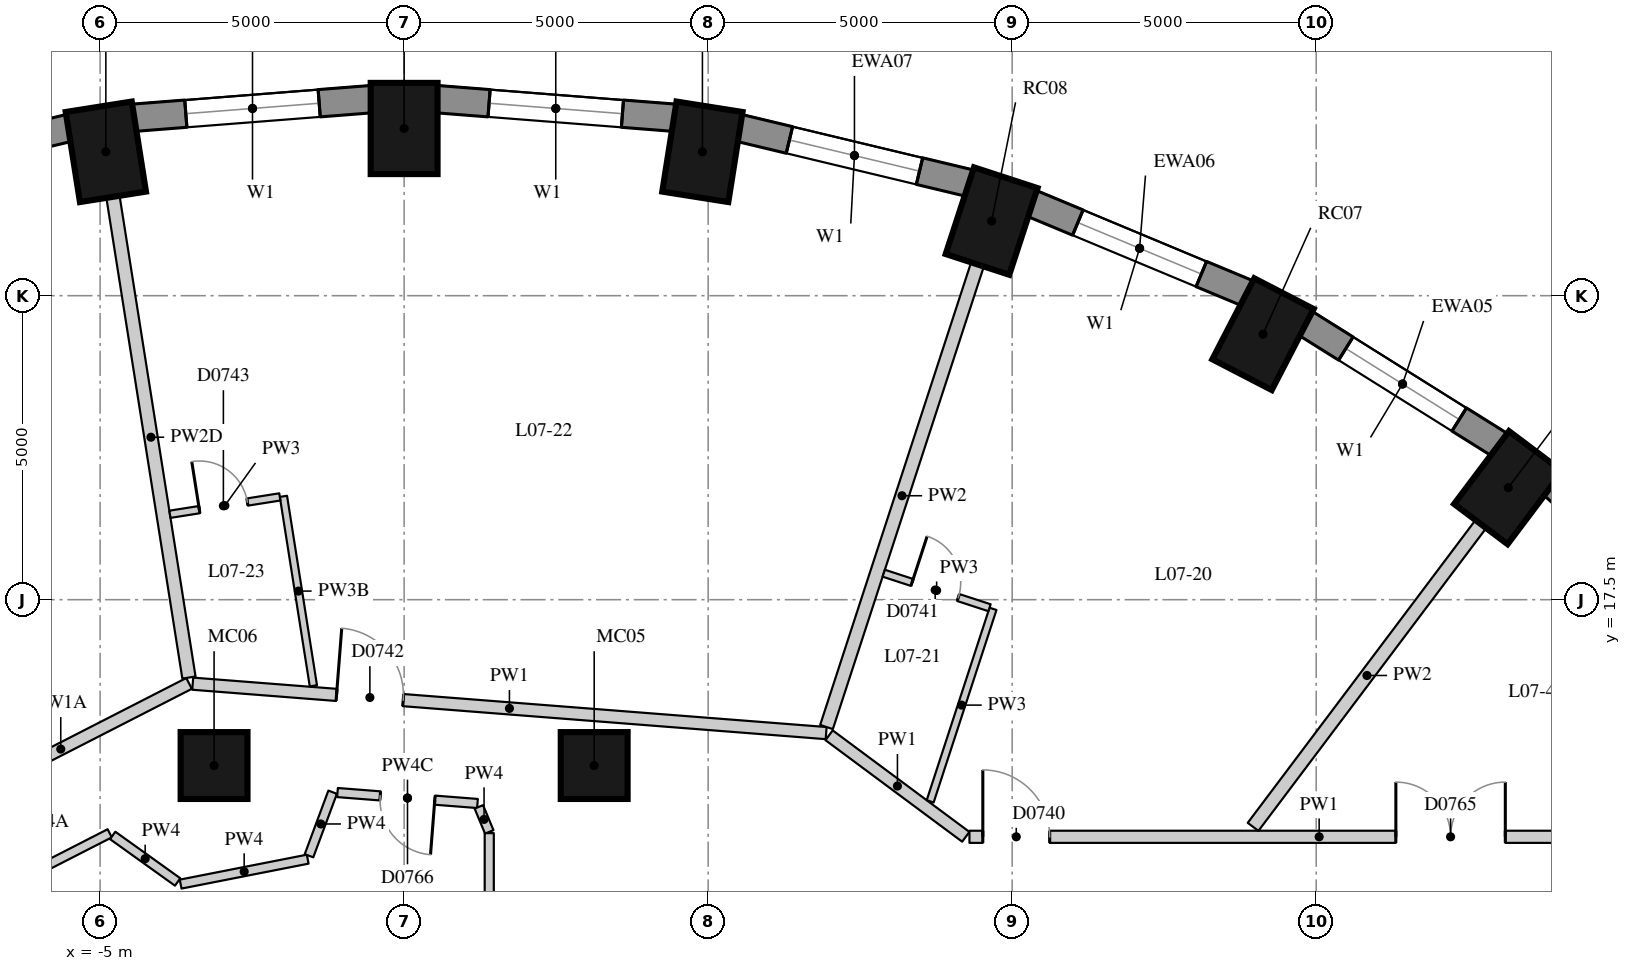
"""IFC4 building model, lengths in metres.
Left out: names, types, materials, properties, quantities, classifications, styles, units other than length and angle.
Written with IfcOpenShell. Run it as: python <this file> out.ifc"""

import sys

from ifc_helpers import new_model, si_unit, direction, frame, frame_2d, origin, origin_2d, place, context, subcontext, project, spatial, rectangle, extrude, element, fill, save


model = new_model("IFC4")
c1 = context("Model", 3, precision=1e-05, world=origin(), true_north=direction((0.0, 1.0)))
c2 = subcontext(c1, "Body", "Model", "MODEL_VIEW")
j1 = project(units=[si_unit("LENGTHUNIT", "METRE"), si_unit("PLANEANGLEUNIT", "RADIAN")], contexts=[c1])
p1 = place(None, origin())
s1 = spatial("IfcSite", under=j1, at=p1, CompositionType="ELEMENT")
p2 = place(p1, origin())
s2 = spatial("IfcBuilding", under=s1, at=p2, CompositionType="ELEMENT")
p3 = place(p2, frame((0.0, 0.0, 31.6)))
s3 = spatial("IfcBuildingStorey", under=s2, at=p3, CompositionType="ELEMENT", Elevation=31.6)
for number, where, z_axis, x_axis in (
    (1, (18.159, 19.343, 0.0), (0.0, 0.0, 1.0), (0.601, 0.799, 0.0)),
    (2, (14.125, 21.867, 0.0), (0.0, 0.0, 1.0), (0.46, 0.888, 0.0)),
    (3, (9.662, 23.727, 0.0), (0.0, 0.0, 1.0), (0.31, 0.951, 0.0)),
    (4, (4.906, 24.866, 0.0), (0.0, 0.0, 1.0), (0.156, 0.988, 0.0)),
    (5, (0.0, 25.25, 0.0), (0.0, 0.0, 1.0), (0.0, 1.0, 0.0)),
    (6, (-4.906, 24.866, 0.0), (0.0, 0.0, 1.0), (-0.156, 0.988, 0.0)),
):
    element("IfcColumn", number, at=place(p3, frame(where, z_axis=z_axis, x_axis=x_axis)), inside=s3, PredefinedType="COLUMN", context=c2, shape_type="SweptSolid", body=[
        extrude(rectangle(XDim=1.5, YDim=1.1, at=origin_2d()), origin(), (0.0, 0.0, 1.0), 3.3),
    ])
for number, where, z_axis, x_axis in (
    (7, (3.126, 14.772, 0.0), (0.0, 0.0, 1.0), (1.0, 0.0, 0.0)),
    (8, (-3.126, 14.772, 0.0), (0.0, 0.0, 1.0), (1.0, 0.0, 0.0)),
):
    element("IfcColumn", number, at=place(p3, frame(where, z_axis=z_axis, x_axis=x_axis)), inside=s3, PredefinedType="COLUMN", context=c2, shape_type="SweptSolid", body=[
        extrude(rectangle(XDim=1.1, YDim=1.1, at=origin_2d()), origin(), (0.0, 0.0, 1.0), 3.3),
    ])
p4 = place(p3, frame((21.627, 16.943, 0.0), z_axis=(0.0, 0.0, 1.0), x_axis=(-0.745526233716, 0.66647628228, 0.0)))
e9 = element("IfcWall", 9, at=p4, inside=s3, PredefinedType="SOLIDWALL", context=c2, shape_type="SweptSolid", body=[
    extrude(rectangle(XDim=3.697, YDim=0.45, at=frame_2d((1.848, 0.0))), origin(), (0.0, 0.0, 1.0), 3.02),
])
p5 = place(p3, frame((18.023, 20.044, 0.0), z_axis=(0.0, 0.0, 1.0), x_axis=(-0.847635480093, 0.530579016629, 0.0)))
e10 = element("IfcWall", 10, at=p5, inside=s3, PredefinedType="SOLIDWALL", context=c2, shape_type="SweptSolid", body=[
    extrude(rectangle(XDim=3.782, YDim=0.45, at=frame_2d((1.891, 0.0))), origin(), (0.0, 0.0, 1.0), 3.02),
])
p6 = place(p5, frame((0.791, 0.0, 0.4)))
e11 = element("IfcOpeningElement", 11, at=p6, cuts=e10, PredefinedType="OPENING", context=c2, shape_type="SweptSolid", body=[
    extrude(rectangle(XDim=2.2, YDim=1.75, at=frame_2d((1.1, 0.875))), frame((0.0, 0.235, 0.0), z_axis=(0.0, -1.0, 0.0), x_axis=(1.0, 0.0, 0.0)), (0.0, 0.0, 1.0), 0.47),
])
p7 = place(p3, frame((13.875, 22.537, 0.0), z_axis=(0.0, 0.0, 1.0), x_axis=(-0.923031964282, 0.384723267966, 0.0)))
e12 = element("IfcWall", 12, at=p7, inside=s3, PredefinedType="SOLIDWALL", context=c2, shape_type="SweptSolid", body=[
    extrude(rectangle(XDim=3.856, YDim=0.45, at=frame_2d((1.928, 0.0))), origin(), (0.0, 0.0, 1.0), 3.02),
])
p8 = place(p7, frame((0.828, 0.0, 0.4)))
e13 = element("IfcOpeningElement", 13, at=p8, cuts=e12, PredefinedType="OPENING", context=c2, shape_type="SweptSolid", body=[
    extrude(rectangle(XDim=2.2, YDim=1.75, at=frame_2d((1.1, 0.875))), frame((0.0, 0.235, 0.0), z_axis=(0.0, -1.0, 0.0), x_axis=(1.0, 0.0, 0.0)), (0.0, 0.0, 1.0), 0.47),
])
p9 = place(p3, frame((9.308, 24.35, 0.0), z_axis=(0.0, 0.0, 1.0), x_axis=(-0.972496561493, 0.232917233979, 0.0)))
e14 = element("IfcWall", 14, at=p9, inside=s3, PredefinedType="SOLIDWALL", context=c2, shape_type="SweptSolid", body=[
    extrude(rectangle(XDim=3.911, YDim=0.45, at=frame_2d((1.956, 0.0))), origin(), (0.0, 0.0, 1.0), 3.02),
])
p10 = place(p9, frame((0.855, 0.0, 0.4)))
e15 = element("IfcOpeningElement", 15, at=p10, cuts=e14, PredefinedType="OPENING", context=c2, shape_type="SweptSolid", body=[
    extrude(rectangle(XDim=2.2, YDim=1.75, at=frame_2d((1.1, 0.875))), frame((0.0, 0.235, 0.0), z_axis=(0.0, -1.0, 0.0), x_axis=(1.0, 0.0, 0.0)), (0.0, 0.0, 1.0), 0.47),
])
p11 = place(p3, frame((4.457, 25.426, 0.0), z_axis=(0.0, 0.0, 1.0), x_axis=(-0.996955972145, 0.077966592873, 0.0)))
e16 = element("IfcWall", 16, at=p11, inside=s3, PredefinedType="SOLIDWALL", context=c2, shape_type="SweptSolid", body=[
    extrude(rectangle(XDim=3.939, YDim=0.45, at=frame_2d((1.97, 0.0))), origin(), (0.0, 0.0, 1.0), 3.02),
])
p12 = place(p11, frame((0.87, 0.0, 0.4)))
e17 = element("IfcOpeningElement", 17, at=p12, cuts=e16, PredefinedType="OPENING", context=c2, shape_type="SweptSolid", body=[
    extrude(rectangle(XDim=2.2, YDim=1.75, at=frame_2d((1.1, 0.875))), frame((0.0, 0.235, 0.0), z_axis=(0.0, -1.0, 0.0), x_axis=(1.0, 0.0, 0.0)), (0.0, 0.0, 1.0), 0.47),
])
p13 = place(p3, frame((-0.53, 25.733, 0.0), z_axis=(0.0, 0.0, 1.0), x_axis=(-0.996955972145, -0.077966592873, 0.0)))
e18 = element("IfcWall", 18, at=p13, inside=s3, PredefinedType="SOLIDWALL", context=c2, shape_type="SweptSolid", body=[
    extrude(rectangle(XDim=3.939, YDim=0.45, at=frame_2d((1.97, 0.0))), origin(), (0.0, 0.0, 1.0), 3.02),
])
p14 = place(p13, frame((0.87, 0.0, 0.4)))
e19 = element("IfcOpeningElement", 19, at=p14, cuts=e18, PredefinedType="OPENING", context=c2, shape_type="SweptSolid", body=[
    extrude(rectangle(XDim=2.2, YDim=1.75, at=frame_2d((1.1, 0.875))), frame((0.0, 0.235, 0.0), z_axis=(0.0, -1.0, 0.0), x_axis=(1.0, 0.0, 0.0)), (0.0, 0.0, 1.0), 0.47),
])
p15 = place(p3, frame((-5.504, 25.26, 0.0), z_axis=(0.0, 0.0, 1.0), x_axis=(-0.972496561493, -0.232917233979, 0.0)))
e20 = element("IfcWall", 20, at=p15, inside=s3, PredefinedType="SOLIDWALL", context=c2, shape_type="SweptSolid", body=[
    extrude(rectangle(XDim=3.911, YDim=0.45, at=frame_2d((1.956, 0.0))), origin(), (0.0, 0.0, 1.0), 3.02),
])
p16 = place(p15, frame((0.855, 0.0, 0.4)))
e21 = element("IfcOpeningElement", 21, at=p16, cuts=e20, PredefinedType="OPENING", context=c2, shape_type="SweptSolid", body=[
    extrude(rectangle(XDim=2.2, YDim=1.75, at=frame_2d((1.1, 0.875))), frame((0.0, 0.235, 0.0), z_axis=(0.0, -1.0, 0.0), x_axis=(1.0, 0.0, 0.0)), (0.0, 0.0, 1.0), 0.47),
])
p17 = place(p3, frame((-7.757, 13.963, 0.0), z_axis=(0.0, 0.0, 1.0), x_axis=(0.89017531408, 0.455618162722, 0.0)))
e22 = element("IfcWall", 22, at=p17, inside=s3, PredefinedType="PARTITIONING", context=c2, shape_type="SweptSolid", body=[
    extrude(rectangle(XDim=4.741, YDim=0.2, at=frame_2d((2.371, 0.0))), origin(), (0.0, 0.0, 1.0), 2.57),
])
p18 = place(p17, frame((0.62, 0.0, 0.0)))
e23 = element("IfcOpeningElement", 23, at=p18, cuts=e22, PredefinedType="OPENING", context=c2, shape_type="SweptSolid", body=[
    extrude(rectangle(XDim=1.1, YDim=2.1, at=frame_2d((0.55, 1.05))), frame((0.0, 0.11, 0.0), z_axis=(0.0, -1.0, 0.0), x_axis=(1.0, 0.0, 0.0)), (0.0, 0.0, 1.0), 0.22),
])
p19 = place(p3, frame((-3.477, 16.118, 0.0), z_axis=(0.0, 0.0, 1.0), x_axis=(0.996970328684, -0.077782798383, 0.0)))
e24 = element("IfcWall", 24, at=p19, inside=s3, PredefinedType="PARTITIONING", context=c2, shape_type="SweptSolid", body=[
    extrude(rectangle(XDim=10.449, YDim=0.2, at=frame_2d((5.225, 0.0))), origin(), (0.0, 0.0, 1.0), 3.02),
])
p20 = place(p19, frame((2.372, 0.0, 0.0)))
e25 = element("IfcOpeningElement", 25, at=p20, cuts=e24, PredefinedType="OPENING", context=c2, shape_type="SweptSolid", body=[
    extrude(rectangle(XDim=1.1, YDim=2.1, at=frame_2d((0.55, 1.05))), frame((0.0, 0.11, 0.0), z_axis=(0.0, -1.0, 0.0), x_axis=(1.0, 0.0, 0.0)), (0.0, 0.0, 1.0), 0.22),
])
p21 = place(p3, frame((6.989, 15.27, 0.0), z_axis=(0.0, 0.0, 1.0), x_axis=(0.8028261118, -0.596213245586, 0.0)))
e26 = element("IfcWall", 26, at=p21, inside=s3, PredefinedType="PARTITIONING", context=c2, shape_type="SweptSolid", body=[
    extrude(rectangle(XDim=2.801, YDim=0.2, at=frame_2d((1.4, 0.0))), origin(), (0.0, 0.0, 1.0), 3.02),
])
p22 = place(p3, frame((9.297, 13.6, 0.0), z_axis=(0.0, 0.0, 1.0), x_axis=(1.0, 0.0, 0.0)))
e27 = element("IfcWall", 27, at=p22, inside=s3, PredefinedType="PARTITIONING", context=c2, shape_type="SweptSolid", body=[
    extrude(rectangle(XDim=11.503, YDim=0.2, at=frame_2d((5.751, 0.0))), origin(), (0.0, 0.0, 1.0), 3.02),
])
p23 = place(p22, frame((0.22, 0.0, 0.0)))
e28 = element("IfcOpeningElement", 28, at=p23, cuts=e27, PredefinedType="OPENING", context=c2, shape_type="SweptSolid", body=[
    extrude(rectangle(XDim=1.1, YDim=2.1, at=frame_2d((0.55, 1.05))), frame((0.0, 0.11, 0.0), z_axis=(0.0, -1.0, 0.0), x_axis=(1.0, 0.0, 0.0)), (0.0, 0.0, 1.0), 0.22),
])
p24 = place(p22, frame((7.013, 0.0, 0.0)))
e29 = element("IfcOpeningElement", 29, at=p24, cuts=e27, PredefinedType="OPENING", context=c2, shape_type="SweptSolid", body=[
    extrude(rectangle(XDim=1.8, YDim=2.1, at=frame_2d((0.9, 1.05))), frame((0.0, 0.11, 0.0), z_axis=(0.0, -1.0, 0.0), x_axis=(1.0, 0.0, 0.0)), (0.0, 0.0, 1.0), 0.22),
])
p25 = place(p3, frame((-3.676, 12.822, 0.0), z_axis=(0.0, 0.0, 1.0), x_axis=(0.981284032016, 0.192565958858, 0.0)))
e30 = element("IfcWall", 30, at=p25, inside=s3, PredefinedType="PARTITIONING", context=c2, shape_type="SweptSolid", body=[
    extrude(rectangle(XDim=2.13, YDim=0.15, at=frame_2d((1.065, 0.0))), origin(), (0.0, 0.0, 1.0), 3.02),
])
p26 = place(p3, frame((-1.564, 13.289, 0.0), z_axis=(0.0, 0.0, 1.0), x_axis=(0.348554808131, 0.937288400509, 0.0)))
e31 = element("IfcWall", 31, at=p26, inside=s3, PredefinedType="PARTITIONING", context=c2, shape_type="SweptSolid", body=[
    extrude(rectangle(XDim=1.115, YDim=0.15, at=frame_2d((0.558, 0.0))), origin(), (0.0, 0.0, 1.0), 3.02),
])
p27 = place(p3, frame((-1.096, 14.328, 0.0), z_axis=(0.0, 0.0, 1.0), x_axis=(0.996959190057, -0.077925434624, 0.0)))
e32 = element("IfcWall", 32, at=p27, inside=s3, PredefinedType="PARTITIONING", context=c2, shape_type="SweptSolid", body=[
    extrude(rectangle(XDim=2.309, YDim=0.15, at=frame_2d((1.155, 0.0))), origin(), (0.0, 0.0, 1.0), 2.42),
])
p28 = place(p27, frame((0.705, 0.0, 0.0)))
e33 = element("IfcOpeningElement", 33, at=p28, cuts=e32, PredefinedType="OPENING", context=c2, shape_type="SweptSolid", body=[
    extrude(rectangle(XDim=0.9, YDim=2.1, at=frame_2d((0.45, 1.05))), frame((0.0, 0.085, 0.0), z_axis=(0.0, -1.0, 0.0), x_axis=(1.0, 0.0, 0.0)), (0.0, 0.0, 1.0), 0.17),
])
p29 = place(p3, frame((1.229, 14.092, 0.0), z_axis=(0.0, 0.0, 1.0), x_axis=(0.38344820197, -0.923562383603, 0.0)))
e34 = element("IfcWall", 34, at=p29, inside=s3, PredefinedType="PARTITIONING", context=c2, shape_type="SweptSolid", body=[
    extrude(rectangle(XDim=0.446, YDim=0.15, at=frame_2d((0.223, 0.0))), origin(), (0.0, 0.0, 1.0), 3.02),
])
p30 = place(p3, frame((1.4, 13.661, 0.0), z_axis=(0.0, 0.0, 1.0), x_axis=(0.0, -1.0, 0.0)))
e35 = element("IfcWall", 35, at=p30, inside=s3, PredefinedType="PARTITIONING", context=c2, shape_type="SweptSolid", body=[
    extrude(rectangle(XDim=4.511, YDim=0.15, at=frame_2d((2.255, 0.0))), origin(), (0.0, 0.0, 1.0), 3.02),
])
p31 = place(p3, frame((-7.047, 12.53, 0.0), z_axis=(0.0, 0.0, 1.0), x_axis=(0.890208185307, 0.455553934032, 0.0)))
e36 = element("IfcWall", 36, at=p31, inside=s3, PredefinedType="PARTITIONING", context=c2, shape_type="SweptSolid", body=[
    extrude(rectangle(XDim=2.477, YDim=0.15, at=frame_2d((1.238, 0.0))), origin(), (0.0, 0.0, 1.0), 2.57),
])
p32 = place(p3, frame((-4.793, 13.623, 0.0), z_axis=(0.0, 0.0, 1.0), x_axis=(0.812853780358, -0.582467794611, 0.0)))
e37 = element("IfcWall", 37, at=p32, inside=s3, PredefinedType="PARTITIONING", context=c2, shape_type="SweptSolid", body=[
    extrude(rectangle(XDim=1.314, YDim=0.15, at=frame_2d((0.657, 0.0))), origin(), (0.0, 0.0, 1.0), 3.02),
])
p33 = place(p3, frame((17.708, 18.743, 0.0), z_axis=(0.0, 0.0, 1.0), x_axis=(-0.601177883261, -0.799115231164, 0.0)))
e38 = element("IfcWall", 38, at=p33, inside=s3, PredefinedType="PARTITIONING", context=c2, shape_type="SweptSolid", body=[
    extrude(rectangle(XDim=6.231, YDim=0.22, at=frame_2d((3.116, 0.0))), origin(), (0.0, 0.0, 1.0), 3.02),
])
p34 = place(p3, frame((9.429, 23.014, 0.0), z_axis=(0.0, 0.0, 1.0), x_axis=(-0.310227384954, -0.950662384669, 0.0)))
e39 = element("IfcWall", 39, at=p34, inside=s3, PredefinedType="PARTITIONING", context=c2, shape_type="SweptSolid", body=[
    extrude(rectangle(XDim=8.003, YDim=0.22, at=frame_2d((4.002, 0.0))), origin(), (0.0, 0.0, 1.0), 3.02),
])
p35 = place(p3, frame((-4.788, 24.125, 0.0), z_axis=(0.0, 0.0, 1.0), x_axis=(0.156108238506, -0.987739954578, 0.0)))
e40 = element("IfcWall", 40, at=p35, inside=s3, PredefinedType="PARTITIONING", context=c2, shape_type="SweptSolid", body=[
    extrude(rectangle(XDim=8.004, YDim=0.22, at=frame_2d((4.002, 0.0))), origin(), (0.0, 0.0, 1.0), 2.47),
])
p36 = place(p3, frame((8.651, 14.183, 0.0), z_axis=(0.0, 0.0, 1.0), x_axis=(0.310239544913, 0.950658416453, 0.0)))
e41 = element("IfcWall", 41, at=p36, inside=s3, PredefinedType="PARTITIONING", context=c2, shape_type="SweptSolid", body=[
    extrude(rectangle(XDim=3.33, YDim=0.12, at=frame_2d((1.665, 0.0))), origin(), (0.0, 0.0, 1.0), 3.02),
])
p37 = place(p3, frame((-1.492, 16.083, 0.0), z_axis=(0.0, 0.0, 1.0), x_axis=(-0.156073831214, 0.987745391895, 0.0)))
e42 = element("IfcWall", 42, at=p37, inside=s3, PredefinedType="PARTITIONING", context=c2, shape_type="SweptSolid", body=[
    extrude(rectangle(XDim=3.155, YDim=0.12, at=frame_2d((1.578, 0.0))), origin(), (0.0, 0.0, 1.0), 2.47),
])
p38 = place(p3, frame((9.627, 17.368, 0.0), z_axis=(0.0, 0.0, 1.0), x_axis=(-0.950678536911, 0.31017788357, 0.0)))
e43 = element("IfcWall", 43, at=p38, inside=s3, PredefinedType="PARTITIONING", context=c2, shape_type="SweptSolid", body=[
    extrude(rectangle(XDim=1.83, YDim=0.12, at=frame_2d((0.915, 0.0))), origin(), (0.0, 0.0, 1.0), 3.02),
])
p39 = place(p38, frame((0.54, 0.0, 0.0)))
e44 = element("IfcOpeningElement", 44, at=p39, cuts=e43, PredefinedType="OPENING", context=c2, shape_type="SweptSolid", body=[
    extrude(rectangle(XDim=0.8, YDim=2.1, at=frame_2d((0.4, 1.05))), frame((0.0, 0.07, 0.0), z_axis=(0.0, -1.0, 0.0), x_axis=(1.0, 0.0, 0.0)), (0.0, 0.0, 1.0), 0.14),
])
p40 = place(p3, frame((-2.044, 19.19, 0.0), z_axis=(0.0, 0.0, 1.0), x_axis=(-0.987722911621, -0.15621603586, 0.0)))
e45 = element("IfcWall", 45, at=p40, inside=s3, PredefinedType="PARTITIONING", context=c2, shape_type="SweptSolid", body=[
    extrude(rectangle(XDim=1.83, YDim=0.12, at=frame_2d((0.915, 0.0))), origin(), (0.0, 0.0, 1.0), 3.02),
])
p41 = place(p40, frame((0.54, 0.0, 0.0)))
e46 = element("IfcOpeningElement", 46, at=p41, cuts=e45, PredefinedType="OPENING", context=c2, shape_type="SweptSolid", body=[
    extrude(rectangle(XDim=0.8, YDim=2.1, at=frame_2d((0.4, 1.05))), frame((0.0, 0.07, 0.0), z_axis=(0.0, -1.0, 0.0), x_axis=(1.0, 0.0, 0.0)), (0.0, 0.0, 1.0), 0.14),
])
p42 = place(p6, origin())
e47 = element("IfcWindow", 47, at=p42, inside=s3, PartitioningType="SINGLE_PANEL", PredefinedType="WINDOW", context=c2, shape_type="SweptSolid", body=[
    extrude(rectangle(XDim=2.2, YDim=1.75, at=frame_2d((1.1, 0.875))), frame((0.0, 0.035, 0.0), z_axis=(0.0, -1.0, 0.0), x_axis=(1.0, 0.0, 0.0)), (0.0, 0.0, 1.0), 0.06),
])
fill(e11, e47)
p43 = place(p8, origin())
e48 = element("IfcWindow", 48, at=p43, inside=s3, PartitioningType="SINGLE_PANEL", PredefinedType="WINDOW", context=c2, shape_type="SweptSolid", body=[
    extrude(rectangle(XDim=2.2, YDim=1.75, at=frame_2d((1.1, 0.875))), frame((0.0, 0.035, 0.0), z_axis=(0.0, -1.0, 0.0), x_axis=(1.0, 0.0, 0.0)), (0.0, 0.0, 1.0), 0.06),
])
fill(e13, e48)
p44 = place(p10, origin())
e49 = element("IfcWindow", 49, at=p44, inside=s3, PartitioningType="SINGLE_PANEL", PredefinedType="WINDOW", context=c2, shape_type="SweptSolid", body=[
    extrude(rectangle(XDim=2.2, YDim=1.75, at=frame_2d((1.1, 0.875))), frame((0.0, 0.035, 0.0), z_axis=(0.0, -1.0, 0.0), x_axis=(1.0, 0.0, 0.0)), (0.0, 0.0, 1.0), 0.06),
])
fill(e15, e49)
p45 = place(p12, origin())
e50 = element("IfcWindow", 50, at=p45, inside=s3, PartitioningType="SINGLE_PANEL", PredefinedType="WINDOW", context=c2, shape_type="SweptSolid", body=[
    extrude(rectangle(XDim=2.2, YDim=1.75, at=frame_2d((1.1, 0.875))), frame((0.0, 0.035, 0.0), z_axis=(0.0, -1.0, 0.0), x_axis=(1.0, 0.0, 0.0)), (0.0, 0.0, 1.0), 0.06),
])
fill(e17, e50)
p46 = place(p14, origin())
e51 = element("IfcWindow", 51, at=p46, inside=s3, PartitioningType="SINGLE_PANEL", PredefinedType="WINDOW", context=c2, shape_type="SweptSolid", body=[
    extrude(rectangle(XDim=2.2, YDim=1.75, at=frame_2d((1.1, 0.875))), frame((0.0, 0.035, 0.0), z_axis=(0.0, -1.0, 0.0), x_axis=(1.0, 0.0, 0.0)), (0.0, 0.0, 1.0), 0.06),
])
fill(e19, e51)
p47 = place(p23, origin())
e52 = element("IfcDoor", 52, at=p47, inside=s3, OperationType="SINGLE_SWING_LEFT", PredefinedType="DOOR", context=c2, shape_type="SweptSolid", body=[
    extrude(rectangle(XDim=1.1, YDim=2.1, at=frame_2d((0.55, 1.05))), frame((0.0, 0.025, 0.0), z_axis=(0.0, -1.0, 0.0), x_axis=(1.0, 0.0, 0.0)), (0.0, 0.0, 1.0), 0.05),
])
fill(e28, e52)
p48 = place(p39, origin())
e53 = element("IfcDoor", 53, at=p48, inside=s3, OperationType="SINGLE_SWING_LEFT", PredefinedType="DOOR", context=c2, shape_type="SweptSolid", body=[
    extrude(rectangle(XDim=0.8, YDim=2.1, at=frame_2d((0.4, 1.05))), frame((0.0, 0.025, 0.0), z_axis=(0.0, -1.0, 0.0), x_axis=(1.0, 0.0, 0.0)), (0.0, 0.0, 1.0), 0.05),
])
fill(e44, e53)
p49 = place(p20, origin())
e54 = element("IfcDoor", 54, at=p49, inside=s3, OperationType="SINGLE_SWING_LEFT", PredefinedType="DOOR", context=c2, shape_type="SweptSolid", body=[
    extrude(rectangle(XDim=1.1, YDim=2.1, at=frame_2d((0.55, 1.05))), frame((0.0, 0.025, 0.0), z_axis=(0.0, -1.0, 0.0), x_axis=(1.0, 0.0, 0.0)), (0.0, 0.0, 1.0), 0.05),
])
fill(e25, e54)
p50 = place(p41, origin())
e55 = element("IfcDoor", 55, at=p50, inside=s3, OperationType="SINGLE_SWING_LEFT", PredefinedType="DOOR", context=c2, shape_type="SweptSolid", body=[
    extrude(rectangle(XDim=0.8, YDim=2.1, at=frame_2d((0.4, 1.05))), frame((0.0, 0.025, 0.0), z_axis=(0.0, -1.0, 0.0), x_axis=(1.0, 0.0, 0.0)), (0.0, 0.0, 1.0), 0.05),
])
fill(e46, e55)
p51 = place(p24, origin())
e56 = element("IfcDoor", 56, at=p51, inside=s3, OperationType="DOUBLE_DOOR_SINGLE_SWING", PredefinedType="DOOR", context=c2, shape_type="SweptSolid", body=[
    extrude(rectangle(XDim=1.8, YDim=2.1, at=frame_2d((0.9, 1.05))), frame((0.0, 0.025, 0.0), z_axis=(0.0, -1.0, 0.0), x_axis=(1.0, 0.0, 0.0)), (0.0, 0.0, 1.0), 0.05),
])
fill(e29, e56)
p52 = place(p28, origin())
e57 = element("IfcDoor", 57, at=p52, inside=s3, OperationType="SINGLE_SWING_LEFT", PredefinedType="DOOR", context=c2, shape_type="SweptSolid", body=[
    extrude(rectangle(XDim=0.9, YDim=2.1, at=frame_2d((0.45, 1.05))), frame((0.0, 0.025, 0.0), z_axis=(0.0, -1.0, 0.0), x_axis=(1.0, 0.0, 0.0)), (0.0, 0.0, 1.0), 0.05),
])
fill(e33, e57)
save(model, sys.argv[1])
